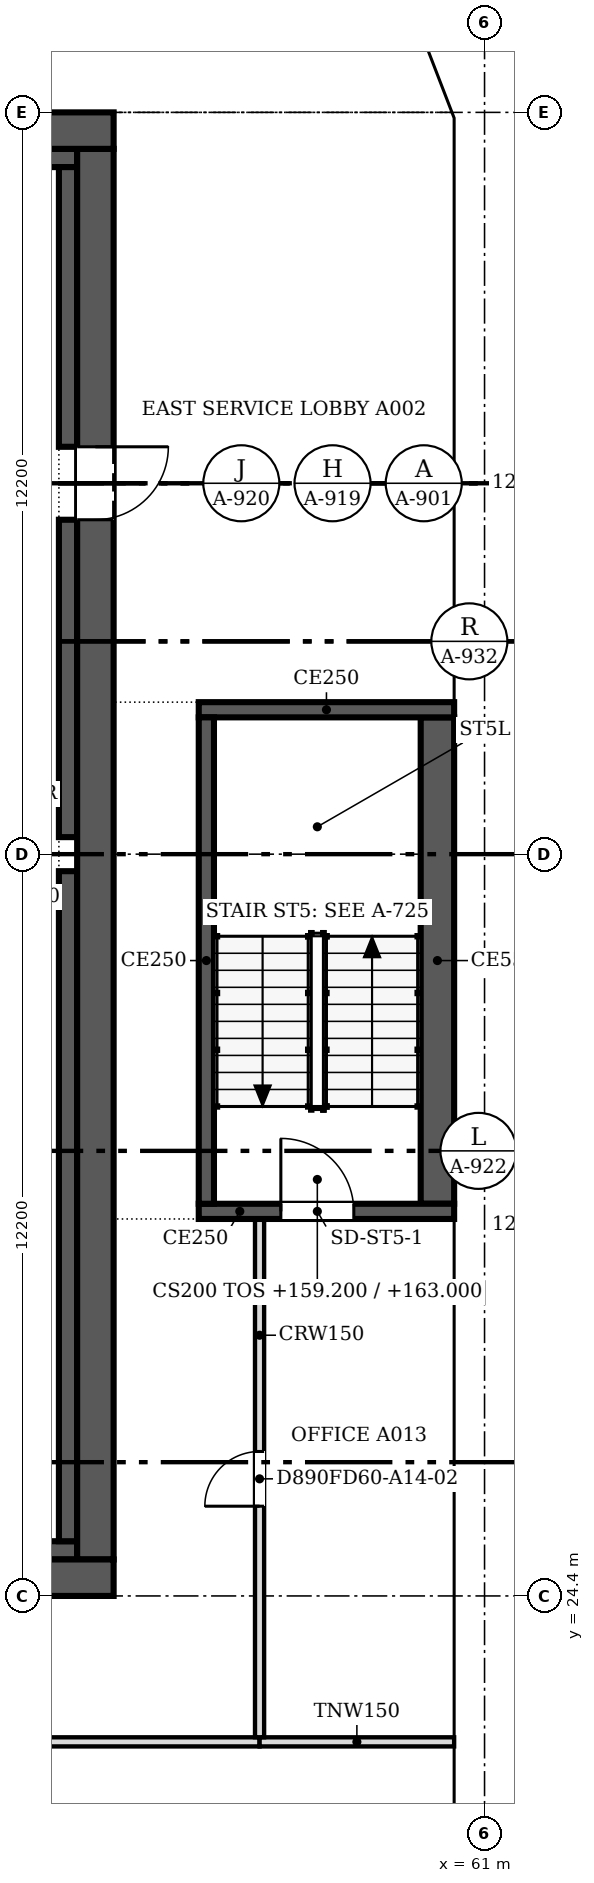
"""IFC4 building model, lengths in metres.
Left out: names, types, materials, properties, quantities, classifications, styles, units other than length and angle.
Written with IfcOpenShell. Run it as: python <this file> out.ifc"""

import sys

from ifc_helpers import new_model, si_unit, direction, frame, frame_2d, origin, place, context, subcontext, project, spatial, polyline, rectangle, outline, extrude, faceted_brep, source, transform, mapped, element, fill, save


model = new_model("IFC4")
c1 = context("Model", 3, precision=1e-05, world=origin(), true_north=direction((0.0, 1.0)))
c2 = subcontext(c1, "Body", "Model", "MODEL_VIEW")
j1 = project(units=[si_unit("LENGTHUNIT", "METRE"), si_unit("PLANEANGLEUNIT", "RADIAN")], contexts=[c1])
p1 = place(None, origin())
s1 = spatial("IfcSite", under=j1, at=p1, CompositionType="ELEMENT")
p2 = place(p1, origin())
s2 = spatial("IfcBuilding", under=s1, at=p2, CompositionType="ELEMENT")
p3 = place(p2, frame((0.0, 0.0, 159.2)))
s3 = spatial("IfcBuildingStorey", under=s2, at=p3, CompositionType="ELEMENT", Elevation=159.2)
m1 = source(origin(), c2, "Body", "SweptSolid", [
    extrude(outline(polyline([(3.05, 0.0), (6.1, 3.8), (3.05, 7.6), (0.0, 3.8), (3.05, 0.0)])), frame((0.0, 0.25, 0.0), z_axis=(0.0, -1.0, 0.0), x_axis=(1.0, 0.0, 0.0)), (0.0, 0.0, 1.0), 0.5),
])
p4 = place(p3, frame((60.75, 15.25, -3.8), z_axis=(0.0, 0.0, 1.0), x_axis=(0.0, 1.0, 0.0)))
e1 = element("IfcWall", 1, at=p4, inside=s3, PredefinedType="SOLIDWALL", context=c2, shape_type="MappedRepresentation", body=[
    mapped(m1, transform((0.0, 0.0, 0.0), scale=1.0)),
])
m2 = source(origin(), c2, "Body", "SweptSolid", [
    extrude(outline(polyline([(3.05, 0.399), (5.78, 3.8), (3.05, 7.201), (0.321, 3.8), (3.05, 0.399)])), frame((0.0, 0.26, 0.0), z_axis=(0.0, -1.0, 0.0), x_axis=(1.0, 0.0, 0.0)), (0.0, 0.0, 1.0), 0.52),
])
p5 = place(p4, origin())
e2 = element("IfcOpeningElement", 2, at=p5, cuts=e1, PredefinedType="OPENING", context=c2, shape_type="MappedRepresentation", body=[
    mapped(m2, transform((0.0, 0.0, 0.0), scale=1.0)),
])
m3 = source(origin(), c2, "Body", "Brep", [
    faceted_brep([(3.05, -0.25, 0.0), (6.1, -0.25, 3.8), (6.1, -0.25, 3.8), (3.05, -0.25, 7.6), (0.0, -0.25, 3.8), (0.0, 0.25, 3.8), (3.05, 0.25, 7.6), (6.1, 0.25, 3.8), (6.1, 0.25, 3.8), (3.05, 0.25, 0.0)], [[[0, 1, 2, 3, 4]], [[5, 6, 7, 8, 9]], [[9, 8, 1, 0]], [[7, 6, 3, 2]], [[6, 5, 4, 3]], [[5, 9, 0, 4]], [[1, 8, 7, 2]]]),
])
p6 = place(p3, frame((60.75, 21.35, -3.8), z_axis=(0.0, 0.0, 1.0), x_axis=(0.0, 1.0, 0.0)))
e3 = element("IfcWall", 3, at=p6, inside=s3, PredefinedType="SOLIDWALL", context=c2, shape_type="MappedRepresentation", body=[
    mapped(m3, transform((0.0, 0.0, 0.0), scale=1.0)),
])
p7 = place(p6, origin())
e4 = element("IfcOpeningElement", 4, at=p7, cuts=e3, PredefinedType="OPENING", context=c2, shape_type="MappedRepresentation", body=[
    mapped(m2, transform((0.0, 0.0, 0.0), scale=1.0)),
])
p8 = place(p3, frame((60.75, 27.45, -3.8), z_axis=(0.0, 0.0, 1.0), x_axis=(0.0, 1.0, 0.0)))
e5 = element("IfcWall", 5, at=p8, inside=s3, PredefinedType="SOLIDWALL", context=c2, shape_type="MappedRepresentation", body=[
    mapped(m1, transform((0.0, 0.0, 0.0), scale=1.0)),
])
p9 = place(p8, origin())
e6 = element("IfcOpeningElement", 6, at=p9, cuts=e5, PredefinedType="OPENING", context=c2, shape_type="MappedRepresentation", body=[
    mapped(m2, transform((0.0, 0.0, 0.0), scale=1.0)),
])
p10 = place(p3, frame((60.75, 33.55, -3.8), z_axis=(0.0, 0.0, 1.0), x_axis=(0.0, 1.0, 0.0)))
e7 = element("IfcWall", 7, at=p10, inside=s3, PredefinedType="SOLIDWALL", context=c2, shape_type="MappedRepresentation", body=[
    mapped(m3, transform((0.0, 0.0, 0.0), scale=1.0)),
])
p11 = place(p10, origin())
e8 = element("IfcOpeningElement", 8, at=p11, cuts=e7, PredefinedType="OPENING", context=c2, shape_type="MappedRepresentation", body=[
    mapped(m2, transform((0.0, 0.0, 0.0), scale=1.0)),
])
p12 = place(p3, frame((60.75, 39.65, -3.8), z_axis=(0.0, 0.0, 1.0), x_axis=(0.0, 1.0, 0.0)))
e9 = element("IfcWall", 9, at=p12, inside=s3, PredefinedType="SOLIDWALL", context=c2, shape_type="MappedRepresentation", body=[
    mapped(m1, transform((0.0, 0.0, 0.0), scale=1.0)),
])
p13 = place(p12, origin())
e10 = element("IfcOpeningElement", 10, at=p13, cuts=e9, PredefinedType="OPENING", context=c2, shape_type="MappedRepresentation", body=[
    mapped(m2, transform((0.0, 0.0, 0.0), scale=1.0)),
])
m4 = source(origin(), c2, "Body", "Brep", [
    faceted_brep([(3.003, -0.25, 0.0), (3.05, -0.25, 0.06), (3.05, -0.25, 7.54), (3.003, -0.25, 7.6), (0.0, -0.25, 3.8), (0.0, 0.25, 3.8), (2.957, 0.25, 7.541), (2.957, 0.25, 0.059), (3.003, 0.0, 0.0), (3.003, 0.0, 7.6)], [[[0, 1, 2, 3, 4]], [[5, 6, 7]], [[1, 0, 8]], [[9, 3, 2]], [[6, 5, 4, 3, 9]], [[5, 7, 8, 0, 4]], [[1, 8, 7, 6, 9, 2]]]),
])
p14 = place(p3, frame((60.75, 45.75, -3.8), z_axis=(0.0, 0.0, 1.0), x_axis=(0.0, 1.0, 0.0)))
e11 = element("IfcWall", 11, at=p14, inside=s3, PredefinedType="SOLIDWALL", context=c2, shape_type="MappedRepresentation", body=[
    mapped(m4, transform((0.0, 0.0, 0.0), scale=1.0)),
])
m5 = source(origin(), c2, "Body", "SweptSolid", [
    extrude(outline(polyline([(2.803, 6.944), (0.319, 3.8), (2.803, 0.656), (2.803, 6.944)])), frame((0.0, 0.26, 0.0), z_axis=(0.0, -1.0, 0.0), x_axis=(1.0, 0.0, 0.0)), (0.0, 0.0, 1.0), 0.52),
])
p15 = place(p14, origin())
e12 = element("IfcOpeningElement", 12, at=p15, cuts=e11, PredefinedType="OPENING", context=c2, shape_type="MappedRepresentation", body=[
    mapped(m5, transform((0.0, 0.0, 0.0), scale=1.0)),
])
m6 = source(origin(), c2, "Body", "Brep", [
    faceted_brep([(0.047, -0.25, 0.0), (2.997, -0.25, 3.8), (0.047, -0.25, 7.6), (0.0, -0.25, 7.541), (0.0, -0.25, 0.059), (0.093, 0.25, 7.54), (2.944, 0.25, 3.868), (2.944, 0.25, 3.732), (0.093, 0.25, 0.06), (2.997, 0.0, 3.8), (0.047, 0.0, 0.0), (0.047, 0.0, 7.6)], [[[0, 1, 2, 3, 4]], [[5, 6, 7, 8]], [[8, 7, 9, 1, 0, 10]], [[6, 5, 11, 2, 1, 9]], [[3, 2, 11]], [[10, 0, 4]], [[8, 10, 4, 3, 11, 5]], [[9, 7, 6]]]),
])
p16 = place(p3, frame((60.767, 48.71, -3.8), z_axis=(0.0, 0.0, 1.0), x_axis=(-0.359901446078, 0.932990326376, 0.0)))
e13 = element("IfcWall", 13, at=p16, inside=s3, PredefinedType="SOLIDWALL", context=c2, shape_type="MappedRepresentation", body=[
    mapped(m6, transform((0.0, 0.0, 0.0), scale=1.0)),
])
m7 = source(origin(), c2, "Body", "SweptSolid", [
    extrude(outline(polyline([(0.247, 0.665), (2.681, 3.8), (0.247, 6.935), (0.247, 0.665)])), frame((0.0, 0.26, 0.0), z_axis=(0.0, -1.0, 0.0), x_axis=(1.0, 0.0, 0.0)), (0.0, 0.0, 1.0), 0.52),
])
p17 = place(p16, origin())
e14 = element("IfcOpeningElement", 14, at=p17, cuts=e13, PredefinedType="OPENING", context=c2, shape_type="MappedRepresentation", body=[
    mapped(m7, transform((0.0, 0.0, 0.0), scale=1.0)),
])
p18 = place(p2, frame((0.0, 0.0, 163.0)))
s4 = spatial("IfcBuildingStorey", under=s2, at=p18, CompositionType="ELEMENT", Elevation=163.0)
p19 = place(p18, frame((60.75, 18.3, -3.8), z_axis=(0.0, 0.0, 1.0), x_axis=(0.0, 1.0, 0.0)))
e15 = element("IfcWall", 15, at=p19, inside=s4, PredefinedType="SOLIDWALL", context=c2, shape_type="MappedRepresentation", body=[
    mapped(m3, transform((0.0, 0.0, 0.0), scale=1.0)),
])
p20 = place(p19, origin())
e16 = element("IfcOpeningElement", 16, at=p20, cuts=e15, PredefinedType="OPENING", context=c2, shape_type="MappedRepresentation", body=[
    mapped(m2, transform((0.0, 0.0, 0.0), scale=1.0)),
])
p21 = place(p18, frame((60.75, 24.4, -3.8), z_axis=(0.0, 0.0, 1.0), x_axis=(0.0, 1.0, 0.0)))
e17 = element("IfcWall", 17, at=p21, inside=s4, PredefinedType="SOLIDWALL", context=c2, shape_type="MappedRepresentation", body=[
    mapped(m1, transform((0.0, 0.0, 0.0), scale=1.0)),
])
p22 = place(p21, origin())
e18 = element("IfcOpeningElement", 18, at=p22, cuts=e17, PredefinedType="OPENING", context=c2, shape_type="MappedRepresentation", body=[
    mapped(m2, transform((0.0, 0.0, 0.0), scale=1.0)),
])
p23 = place(p18, frame((60.75, 30.5, -3.8), z_axis=(0.0, 0.0, 1.0), x_axis=(0.0, 1.0, 0.0)))
e19 = element("IfcWall", 19, at=p23, inside=s4, PredefinedType="SOLIDWALL", context=c2, shape_type="MappedRepresentation", body=[
    mapped(m1, transform((0.0, 0.0, 0.0), scale=1.0)),
])
p24 = place(p23, origin())
e20 = element("IfcOpeningElement", 20, at=p24, cuts=e19, PredefinedType="OPENING", context=c2, shape_type="MappedRepresentation", body=[
    mapped(m2, transform((0.0, 0.0, 0.0), scale=1.0)),
])
p25 = place(p18, frame((60.75, 36.6, -3.8), z_axis=(0.0, 0.0, 1.0), x_axis=(0.0, 1.0, 0.0)))
e21 = element("IfcWall", 21, at=p25, inside=s4, PredefinedType="SOLIDWALL", context=c2, shape_type="MappedRepresentation", body=[
    mapped(m3, transform((0.0, 0.0, 0.0), scale=1.0)),
])
p26 = place(p25, origin())
e22 = element("IfcOpeningElement", 22, at=p26, cuts=e21, PredefinedType="OPENING", context=c2, shape_type="MappedRepresentation", body=[
    mapped(m2, transform((0.0, 0.0, 0.0), scale=1.0)),
])
m8 = source(origin(), c2, "Body", "Brep", [
    faceted_brep([(3.05, -0.25, 0.0), (6.053, -0.25, 3.8), (3.05, -0.25, 7.6), (0.0, -0.25, 3.8), (0.0, 0.25, 3.8), (3.05, 0.25, 7.6), (6.007, 0.25, 3.859), (6.007, 0.25, 3.741), (3.05, 0.25, 0.0), (6.053, 0.0, 3.8)], [[[0, 1, 2, 3]], [[4, 5, 6, 7, 8]], [[8, 7, 9, 1, 0]], [[6, 5, 2, 1, 9]], [[5, 4, 3, 2]], [[4, 8, 0, 3]], [[9, 7, 6]]]),
])
p27 = place(p18, frame((60.75, 42.7, -3.8), z_axis=(0.0, 0.0, 1.0), x_axis=(0.0, 1.0, 0.0)))
e23 = element("IfcWall", 23, at=p27, inside=s4, PredefinedType="SOLIDWALL", context=c2, shape_type="MappedRepresentation", body=[
    mapped(m8, transform((0.0, 0.0, 0.0), scale=1.0)),
])
m9 = source(origin(), c2, "Body", "SweptSolid", [
    extrude(outline(polyline([(3.049, 0.401), (5.735, 3.8), (3.049, 7.199), (0.321, 3.8), (3.049, 0.401)])), frame((0.0, 0.26, 0.0), z_axis=(0.0, -1.0, 0.0), x_axis=(1.0, 0.0, 0.0)), (0.0, 0.0, 1.0), 0.52),
])
p28 = place(p27, origin())
e24 = element("IfcOpeningElement", 24, at=p28, cuts=e23, PredefinedType="OPENING", context=c2, shape_type="MappedRepresentation", body=[
    mapped(m9, transform((0.0, 0.0, 0.0), scale=1.0)),
])
m10 = source(origin(), c2, "Body", "Brep", [
    faceted_brep([(2.95, -0.25, 0.0), (3.003, -0.25, 0.068), (3.003, -0.25, 7.532), (2.95, -0.25, 7.6), (0.0, -0.25, 3.8), (0.047, 0.25, 3.86), (2.898, 0.25, 7.532), (2.898, 0.25, 0.068), (0.047, 0.25, 3.74), (2.95, 0.0, 0.0), (2.95, 0.0, 7.6), (0.0, 0.0, 3.8)], [[[0, 1, 2, 3, 4]], [[5, 6, 7, 8]], [[1, 0, 9]], [[10, 3, 2]], [[6, 5, 11, 4, 3, 10]], [[8, 7, 9, 0, 4, 11]], [[8, 11, 5]], [[1, 9, 7, 6, 10, 2]]]),
])
p29 = place(p18, frame((60.75, 48.753, -3.8), z_axis=(0.0, 0.0, 1.0), x_axis=(-0.35992665181, 0.932980602862, 0.0)))
e25 = element("IfcWall", 25, at=p29, inside=s4, PredefinedType="SOLIDWALL", context=c2, shape_type="MappedRepresentation", body=[
    mapped(m10, transform((0.0, 0.0, 0.0), scale=1.0)),
])
m11 = source(origin(), c2, "Body", "SweptSolid", [
    extrude(outline(polyline([(2.75, 6.935), (0.316, 3.8), (2.75, 0.665), (2.75, 6.935)])), frame((0.0, 0.26, 0.0), z_axis=(0.0, -1.0, 0.0), x_axis=(1.0, 0.0, 0.0)), (0.0, 0.0, 1.0), 0.52),
])
p30 = place(p29, origin())
e26 = element("IfcOpeningElement", 26, at=p30, cuts=e25, PredefinedType="OPENING", context=c2, shape_type="MappedRepresentation", body=[
    mapped(m11, transform((0.0, 0.0, 0.0), scale=1.0)),
])
p31 = place(p3, frame((54.9, 24.7, 0.0), z_axis=(0.0, 0.0, 1.0), x_axis=(-1.0, 0.0, 0.0)))
e27 = element("IfcWall", 27, at=p31, inside=s3, PredefinedType="SHEAR", context=c2, shape_type="SweptSolid", body=[
    extrude(rectangle(XDim=24.4, YDim=0.6, at=frame_2d((12.2, 0.0))), origin(), (0.0, 0.0, 1.0), 3.8),
])
m12 = source(origin(), c2, "Body", "SweptSolid", [
    extrude(rectangle(XDim=1.2, YDim=2.1, at=frame_2d((0.6, 1.05))), frame((0.0, 0.31, 0.0), z_axis=(0.0, -1.0, 0.0), x_axis=(1.0, 0.0, 0.0)), (0.0, 0.0, 1.0), 0.62),
])
p32 = place(p31, frame((1.5, 0.0, 0.0)))
e28 = element("IfcOpeningElement", 28, at=p32, cuts=e27, PredefinedType="OPENING", context=c2, shape_type="MappedRepresentation", body=[
    mapped(m12, transform((0.0, 0.0, 0.0), scale=1.0)),
])
p33 = place(p3, frame((30.5, 48.5, 0.0), z_axis=(0.0, 0.0, 1.0), x_axis=(1.0, 0.0, 0.0)))
e29 = element("IfcWall", 29, at=p33, inside=s3, PredefinedType="SHEAR", context=c2, shape_type="SweptSolid", body=[
    extrude(rectangle(XDim=24.4, YDim=0.6, at=frame_2d((12.2, 0.0))), origin(), (0.0, 0.0, 1.0), 3.8),
])
p34 = place(p3, frame((54.6, 48.2, 0.0), z_axis=(0.0, 0.0, 1.0), x_axis=(0.0, -1.0, 0.0)))
e30 = element("IfcWall", 30, at=p34, inside=s3, PredefinedType="SHEAR", context=c2, shape_type="SweptSolid", body=[
    extrude(rectangle(XDim=23.2, YDim=0.6, at=frame_2d((11.6, 0.0))), origin(), (0.0, 0.0, 1.0), 3.8),
])
p35 = place(p34, frame((4.9, 0.0, 0.0)))
e31 = element("IfcOpeningElement", 31, at=p35, cuts=e30, PredefinedType="OPENING", context=c2, shape_type="MappedRepresentation", body=[
    mapped(m12, transform((0.0, 0.0, 0.0), scale=1.0)),
])
p36 = place(p3, frame((53.4, 25.15, 0.0), z_axis=(0.0, 0.0, 1.0), x_axis=(1.0, 0.0, 0.0)))
e32 = element("IfcWall", 32, at=p36, inside=s3, PredefinedType="SOLIDWALL", context=c2, shape_type="SweptSolid", body=[
    extrude(rectangle(XDim=0.9, YDim=0.3, at=frame_2d((0.45, 0.0))), origin(), (0.0, 0.0, 1.0), 3.8),
])
p37 = place(p3, frame((31.1, 48.05, 0.0), z_axis=(0.0, 0.0, 1.0), x_axis=(1.0, 0.0, 0.0)))
e33 = element("IfcWall", 33, at=p37, inside=s3, PredefinedType="SOLIDWALL", context=c2, shape_type="SweptSolid", body=[
    extrude(rectangle(XDim=23.2, YDim=0.3, at=frame_2d((11.6, 0.0))), origin(), (0.0, 0.0, 1.0), 3.8),
])
p38 = place(p3, frame((54.15, 25.3, 0.0), z_axis=(0.0, 0.0, 1.0), x_axis=(0.0, 1.0, 0.0)))
e34 = element("IfcWall", 34, at=p38, inside=s3, PredefinedType="SOLIDWALL", context=c2, shape_type="SweptSolid", body=[
    extrude(rectangle(XDim=11.02, YDim=0.3, at=frame_2d((5.51, 0.0))), origin(), (0.0, 0.0, 1.0), 3.8),
])
p39 = place(p3, frame((54.15, 36.88, 0.0), z_axis=(0.0, 0.0, 1.0), x_axis=(0.0, 1.0, 0.0)))
e35 = element("IfcWall", 35, at=p39, inside=s3, PredefinedType="SOLIDWALL", context=c2, shape_type="SweptSolid", body=[
    extrude(rectangle(XDim=5.22, YDim=0.3, at=frame_2d((2.61, 0.0))), origin(), (0.0, 0.0, 1.0), 3.8),
])
p40 = place(p3, frame((54.15, 43.3, 0.0), z_axis=(0.0, 0.0, 1.0), x_axis=(0.0, 1.0, 0.0)))
e36 = element("IfcWall", 36, at=p40, inside=s3, PredefinedType="SOLIDWALL", context=c2, shape_type="SweptSolid", body=[
    extrude(rectangle(XDim=4.6, YDim=0.3, at=frame_2d((2.3, 0.0))), origin(), (0.0, 0.0, 1.0), 3.8),
])
p41 = place(p3, frame((60.5, 30.725, 0.0), z_axis=(0.0, 0.0, 1.0), x_axis=(-1.0, 0.0, 0.0)))
e37 = element("IfcWall", 37, at=p41, inside=s3, PredefinedType="SOLIDWALL", context=c2, shape_type="SweptSolid", body=[
    extrude(rectangle(XDim=4.2, YDim=0.25, at=frame_2d((2.1, 0.0))), origin(), (0.0, 0.0, 1.0), 3.8),
])
m13 = source(origin(), c2, "Body", "SweptSolid", [
    extrude(rectangle(XDim=1.2, YDim=2.1, at=frame_2d((0.6, 1.05))), frame((0.0, 0.135, 0.0), z_axis=(0.0, -1.0, 0.0), x_axis=(1.0, 0.0, 0.0)), (0.0, 0.0, 1.0), 0.27),
])
p42 = place(p41, frame((1.65, 0.0, 0.0)))
e38 = element("IfcOpeningElement", 38, at=p42, cuts=e37, PredefinedType="OPENING", context=c2, shape_type="MappedRepresentation", body=[
    mapped(m13, transform((0.0, 0.0, 0.0), scale=1.0)),
])
p43 = place(p3, frame((56.425, 30.85, 0.0), z_axis=(0.0, 0.0, 1.0), x_axis=(0.0, 1.0, 0.0)))
e39 = element("IfcWall", 39, at=p43, inside=s3, PredefinedType="SOLIDWALL", context=c2, shape_type="SweptSolid", body=[
    extrude(rectangle(XDim=8.0, YDim=0.25, at=frame_2d((4.0, 0.0))), origin(), (0.0, 0.0, 1.0), 3.8),
])
p44 = place(p3, frame((56.3, 38.975, 0.0), z_axis=(0.0, 0.0, 1.0), x_axis=(1.0, 0.0, 0.0)))
e40 = element("IfcWall", 40, at=p44, inside=s3, PredefinedType="SOLIDWALL", context=c2, shape_type="SweptSolid", body=[
    extrude(rectangle(XDim=4.2, YDim=0.25, at=frame_2d((2.1, 0.0))), origin(), (0.0, 0.0, 1.0), 3.8),
])
p45 = place(p3, frame((60.225, 38.85, 0.0), z_axis=(0.0, 0.0, 1.0), x_axis=(0.0, -1.0, 0.0)))
e41 = element("IfcWall", 41, at=p45, inside=s3, PredefinedType="SOLIDWALL", context=c2, shape_type="SweptSolid", body=[
    extrude(rectangle(XDim=8.0, YDim=0.55, at=frame_2d((4.0, 0.0))), origin(), (0.0, 0.0, 1.0), 3.8),
])
p46 = place(p3, frame((45.4, 22.0, 0.0), z_axis=(0.0, 0.0, 1.0), x_axis=(1.0, 0.0, 0.0)))
e42 = element("IfcWall", 42, at=p46, inside=s3, PredefinedType="PARTITIONING", context=c2, shape_type="SweptSolid", body=[
    extrude(rectangle(XDim=11.9, YDim=0.15, at=frame_2d((5.95, 0.0))), origin(), (0.0, 0.0, 1.0), 3.067),
])
p47 = place(p3, frame((57.301, 22.0, 0.0), z_axis=(0.0, 0.0, 1.0), x_axis=(1.0, 0.0, 0.0)))
e43 = element("IfcWall", 43, at=p47, inside=s3, PredefinedType="PARTITIONING", context=c2, shape_type="SweptSolid", body=[
    extrude(rectangle(XDim=3.199, YDim=0.15, at=frame_2d((1.6, 0.0))), origin(), (0.0, 0.0, 1.0), 3.067),
])
p48 = place(p3, frame((57.3, 30.6, 0.0), z_axis=(0.0, 0.0, 1.0), x_axis=(0.0, -1.0, 0.0)))
e44 = element("IfcWall", 44, at=p48, inside=s3, PredefinedType="PARTITIONING", context=c2, shape_type="SweptSolid", body=[
    extrude(rectangle(XDim=8.524, YDim=0.15, at=frame_2d((4.262, 0.0))), origin(), (0.0, 0.0, 1.0), 3.067),
])
m14 = source(origin(), c2, "Body", "SweptSolid", [
    extrude(rectangle(XDim=0.9, YDim=2.1, at=frame_2d((0.45, 1.05))), frame((0.0, 0.085, 0.0), z_axis=(0.0, -1.0, 0.0), x_axis=(1.0, 0.0, 0.0)), (0.0, 0.0, 1.0), 0.17),
])
p49 = place(p48, frame((3.824, 0.0, 0.0)))
e45 = element("IfcOpeningElement", 45, at=p49, cuts=e44, PredefinedType="OPENING", context=c2, shape_type="MappedRepresentation", body=[
    mapped(m14, transform((0.0, 0.0, 0.0), scale=1.0)),
])
m15 = source(origin(), c2, "Body", "SweptSolid", [
    extrude(rectangle(XDim=1.2, YDim=2.1, at=frame_2d((0.6, 1.05))), frame((0.0, 0.025, 0.0), z_axis=(0.0, -1.0, 0.0), x_axis=(1.0, 0.0, 0.0)), (0.0, 0.0, 1.0), 0.05),
])
p50 = place(p35, origin())
e46 = element("IfcDoor", 46, at=p50, inside=s3, OperationType="SINGLE_SWING_LEFT", PredefinedType="DOOR", context=c2, shape_type="MappedRepresentation", body=[
    mapped(m15, transform((0.0, 0.0, 0.0), scale=1.0)),
])
fill(e31, e46)
p51 = place(p42, origin())
e47 = element("IfcDoor", 47, at=p51, inside=s3, OperationType="SINGLE_SWING_RIGHT", PredefinedType="DOOR", context=c2, shape_type="MappedRepresentation", body=[
    mapped(m15, transform((0.0, 0.0, 0.0), scale=1.0)),
])
fill(e38, e47)
m16 = source(origin(), c2, "Body", "SweptSolid", [
    extrude(rectangle(XDim=0.9, YDim=2.1, at=frame_2d((0.45, 1.05))), frame((0.0, 0.025, 0.0), z_axis=(0.0, -1.0, 0.0), x_axis=(1.0, 0.0, 0.0)), (0.0, 0.0, 1.0), 0.05),
])
p52 = place(p49, origin())
e48 = element("IfcDoor", 48, at=p52, inside=s3, OperationType="SINGLE_SWING_RIGHT", PredefinedType="DOOR", context=c2, shape_type="MappedRepresentation", body=[
    mapped(m16, transform((0.0, 0.0, 0.0), scale=1.0)),
])
fill(e45, e48)
save(model, sys.argv[1])
